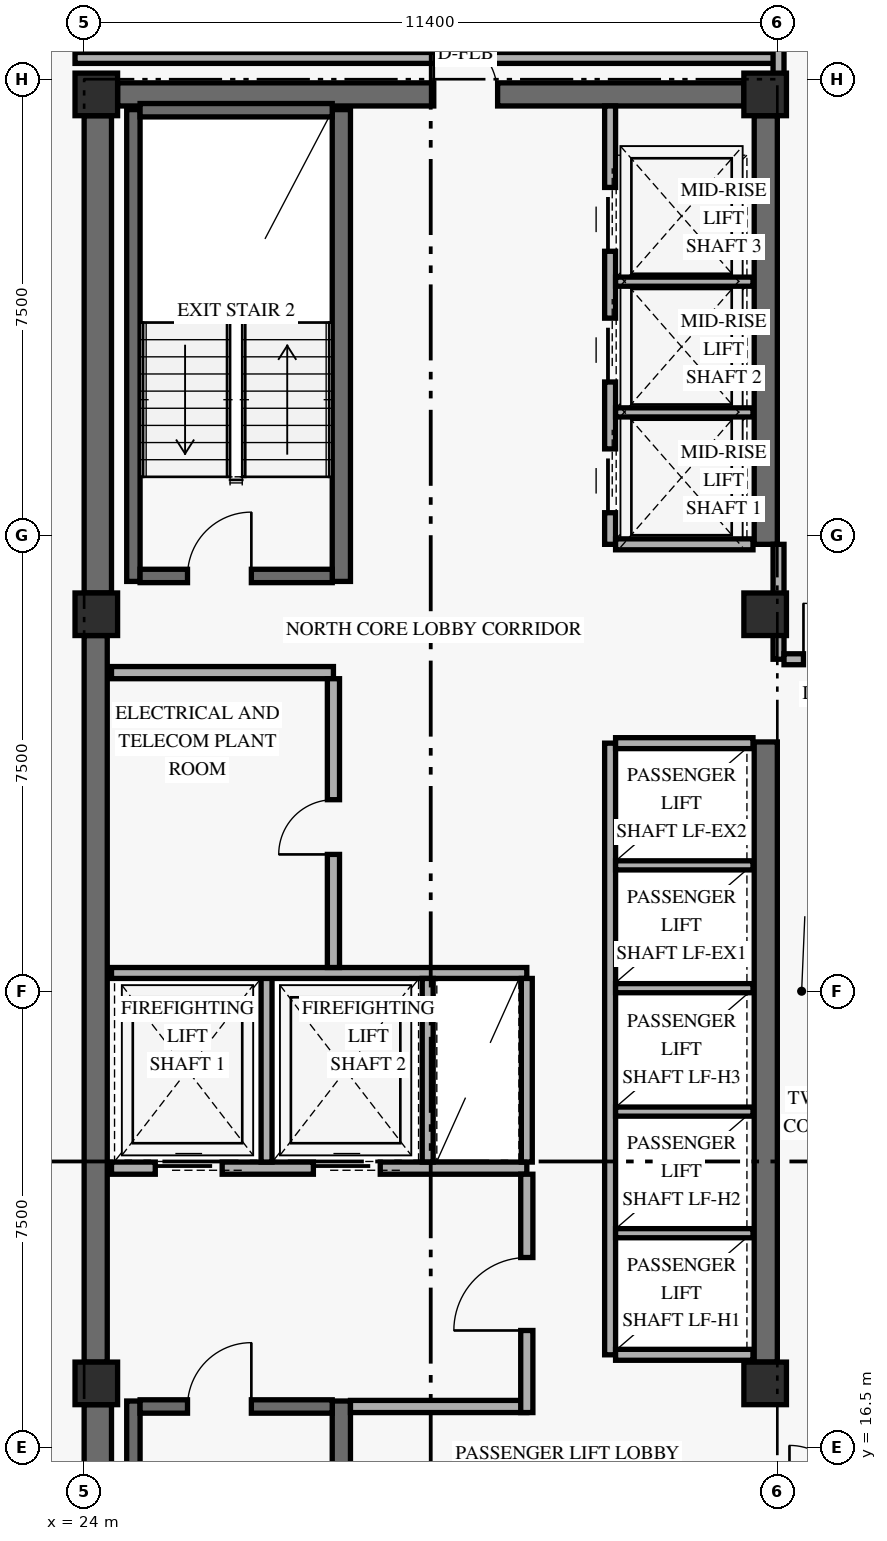
"""IFC4 building model, lengths in metres.
Left out: names, types, materials, properties, quantities, classifications, styles, units other than length and angle.
Written with IfcOpenShell. Run it as: python <this file> out.ifc"""

import sys

from ifc_helpers import new_model, si_unit, direction, frame, frame_2d, origin, origin_2d, place, context, subcontext, project, spatial, rectangle, extrude, element, fill, save


model = new_model("IFC4")
c1 = context("Model", 3, precision=1e-05, world=origin(), true_north=direction((0.0, 1.0)))
c2 = subcontext(c1, "Body", "Model", "MODEL_VIEW")
j1 = project(units=[si_unit("LENGTHUNIT", "METRE"), si_unit("PLANEANGLEUNIT", "RADIAN")], contexts=[c1])
p1 = place(None, origin())
s1 = spatial("IfcSite", under=j1, at=p1, CompositionType="ELEMENT")
p2 = place(p1, origin())
s2 = spatial("IfcBuilding", under=s1, at=p2, CompositionType="ELEMENT")
p3 = place(p2, frame((0.0, 0.0, 177.6)))
s3 = spatial("IfcBuildingStorey", under=s2, at=p3, CompositionType="ELEMENT", Elevation=177.6)
p4 = place(p3, frame((24.225, 9.6, 0.0), z_axis=(0.0, 0.0, 1.0), x_axis=(0.0, 1.0, 0.0)))
e1 = element("IfcWall", 1, at=p4, inside=s3, PredefinedType="SHEAR", context=c2, shape_type="SweptSolid", body=[
    extrude(rectangle(XDim=7.6, YDim=0.45, at=frame_2d((3.8, 0.0))), origin(), (0.0, 0.0, 1.0), 2.748),
])
p5 = place(p3, frame((24.19, 17.9, 0.0), z_axis=(0.0, 0.0, 1.0), x_axis=(0.0, 1.0, 0.0)))
e2 = element("IfcWall", 2, at=p5, inside=s3, PredefinedType="SHEAR", context=c2, shape_type="SweptSolid", body=[
    extrude(rectangle(XDim=11.95, YDim=0.38, at=frame_2d((5.975, 0.0))), origin(), (0.0, 0.0, 1.0), 2.748),
])
p6 = place(p3, frame((24.225, 30.55, 0.0), z_axis=(0.0, 0.0, 1.0), x_axis=(0.0, 1.0, 0.0)))
e3 = element("IfcWall", 3, at=p6, inside=s3, PredefinedType="SHEAR", context=c2, shape_type="SweptSolid", body=[
    extrude(rectangle(XDim=7.85, YDim=0.45, at=frame_2d((3.925, 0.0))), origin(), (0.0, 0.0, 1.0), 2.748),
])
p7 = place(p3, frame((35.21, 17.9, 0.0), z_axis=(0.0, 0.0, 1.0), x_axis=(0.0, 1.0, 0.0)))
e4 = element("IfcWall", 4, at=p7, inside=s3, PredefinedType="SHEAR", context=c2, shape_type="SweptSolid", body=[
    extrude(rectangle(XDim=10.2, YDim=0.38, at=frame_2d((5.1, 0.0))), origin(), (0.0, 0.0, 1.0), 2.748),
])
p8 = place(p3, frame((35.21, 31.35, 0.0), z_axis=(0.0, 0.0, 1.0), x_axis=(0.0, 1.0, 0.0)))
e5 = element("IfcWall", 5, at=p8, inside=s3, PredefinedType="SHEAR", context=c2, shape_type="SweptSolid", body=[
    extrude(rectangle(XDim=7.05, YDim=0.38, at=frame_2d((3.525, 0.0))), origin(), (0.0, 0.0, 1.0), 2.748),
])
p9 = place(p3, frame((24.55, 38.75, 0.0), z_axis=(0.0, 0.0, 1.0), x_axis=(1.0, 0.0, 0.0)))
e6 = element("IfcWall", 6, at=p9, inside=s3, PredefinedType="SHEAR", context=c2, shape_type="SweptSolid", body=[
    extrude(rectangle(XDim=10.3, YDim=0.38, at=frame_2d((5.15, 0.0))), origin(), (0.0, 0.0, 1.0), 3.36),
])
p10 = place(p9, frame((5.2, 0.0, 0.0)))
e7 = element("IfcOpeningElement", 7, at=p10, cuts=e6, PredefinedType="OPENING", context=c2, shape_type="SweptSolid", body=[
    extrude(rectangle(XDim=1.05, YDim=2.15, at=frame_2d((0.525, 1.075))), frame((0.0, 0.2, 0.0), z_axis=(0.0, -1.0, 0.0), x_axis=(1.0, 0.0, 0.0)), (0.0, 0.0, 1.0), 0.4),
])
p11 = place(p3, frame((24.81, 9.5, 0.0), z_axis=(0.0, 0.0, 1.0), x_axis=(0.0, 1.0, 0.0)))
e8 = element("IfcWall", 8, at=p11, inside=s3, PredefinedType="SHEAR", context=c2, shape_type="SweptSolid", body=[
    extrude(rectangle(XDim=7.76, YDim=0.22, at=frame_2d((3.88, 0.0))), origin(), (0.0, 0.0, 1.0), 3.36),
])
p12 = place(p3, frame((28.23, 9.5, 0.0), z_axis=(0.0, 0.0, 1.0), x_axis=(0.0, 1.0, 0.0)))
e9 = element("IfcWall", 9, at=p12, inside=s3, PredefinedType="SHEAR", context=c2, shape_type="SweptSolid", body=[
    extrude(rectangle(XDim=7.76, YDim=0.3, at=frame_2d((3.88, 0.0))), origin(), (0.0, 0.0, 1.0), 3.36),
])
p13 = place(p3, frame((24.92, 17.17, 0.0), z_axis=(0.0, 0.0, 1.0), x_axis=(1.0, 0.0, 0.0)))
e10 = element("IfcWall", 10, at=p13, inside=s3, PredefinedType="SHEAR", context=c2, shape_type="SweptSolid", body=[
    extrude(rectangle(XDim=3.16, YDim=0.22, at=frame_2d((1.58, 0.0))), origin(), (0.0, 0.0, 1.0), 3.36),
])
p14 = place(p13, frame((0.78, 0.0, 0.0)))
e11 = element("IfcOpeningElement", 11, at=p14, cuts=e10, PredefinedType="OPENING", context=c2, shape_type="SweptSolid", body=[
    extrude(rectangle(XDim=1.05, YDim=2.15, at=frame_2d((0.525, 1.075))), frame((0.0, 0.12, 0.0), z_axis=(0.0, -1.0, 0.0), x_axis=(1.0, 0.0, 0.0)), (0.0, 0.0, 1.0), 0.24),
])
p15 = place(p3, frame((24.81, 30.74, 0.0), z_axis=(0.0, 0.0, 1.0), x_axis=(0.0, 1.0, 0.0)))
e12 = element("IfcWall", 12, at=p15, inside=s3, PredefinedType="SHEAR", context=c2, shape_type="SweptSolid", body=[
    extrude(rectangle(XDim=7.76, YDim=0.22, at=frame_2d((3.88, 0.0))), origin(), (0.0, 0.0, 1.0), 3.36),
])
p16 = place(p3, frame((28.23, 30.74, 0.0), z_axis=(0.0, 0.0, 1.0), x_axis=(0.0, 1.0, 0.0)))
e13 = element("IfcWall", 13, at=p16, inside=s3, PredefinedType="SHEAR", context=c2, shape_type="SweptSolid", body=[
    extrude(rectangle(XDim=7.76, YDim=0.3, at=frame_2d((3.88, 0.0))), origin(), (0.0, 0.0, 1.0), 3.36),
])
p17 = place(p3, frame((24.92, 30.83, 0.0), z_axis=(0.0, 0.0, 1.0), x_axis=(1.0, 0.0, 0.0)))
e14 = element("IfcWall", 14, at=p17, inside=s3, PredefinedType="SHEAR", context=c2, shape_type="SweptSolid", body=[
    extrude(rectangle(XDim=3.16, YDim=0.22, at=frame_2d((1.58, 0.0))), origin(), (0.0, 0.0, 1.0), 3.36),
])
p18 = place(p17, frame((0.78, 0.0, 0.0)))
e15 = element("IfcOpeningElement", 15, at=p18, cuts=e14, PredefinedType="OPENING", context=c2, shape_type="SweptSolid", body=[
    extrude(rectangle(XDim=1.05, YDim=2.15, at=frame_2d((0.525, 1.075))), frame((0.0, 0.12, 0.0), z_axis=(0.0, -1.0, 0.0), x_axis=(1.0, 0.0, 0.0)), (0.0, 0.0, 1.0), 0.24),
])
p19 = place(p3, frame((24.92, 38.49, 0.0), z_axis=(0.0, 0.0, 1.0), x_axis=(1.0, 0.0, 0.0)))
e16 = element("IfcWall", 16, at=p19, inside=s3, PredefinedType="SHEAR", context=c2, shape_type="SweptSolid", body=[
    extrude(rectangle(XDim=3.16, YDim=0.22, at=frame_2d((1.58, 0.0))), origin(), (0.0, 0.0, 1.0), 3.36),
])
for number, where, z_axis, x_axis in (
    (17, (24.2, 17.55, 0.0), (0.0, 0.0, 1.0), (1.0, 0.0, 0.0)),
    (18, (24.2, 30.2, 0.0), (0.0, 0.0, 1.0), (1.0, 0.0, 0.0)),
    (19, (24.2, 38.75, 0.0), (0.0, 0.0, 1.0), (1.0, 0.0, 0.0)),
    (20, (35.2, 17.55, 0.0), (0.0, 0.0, 1.0), (1.0, 0.0, 0.0)),
    (21, (35.2, 30.2, 0.0), (0.0, 0.0, 1.0), (1.0, 0.0, 0.0)),
    (22, (35.2, 38.75, 0.0), (0.0, 0.0, 1.0), (1.0, 0.0, 0.0)),
):
    element("IfcColumn", number, at=place(p3, frame(where, z_axis=z_axis, x_axis=x_axis)), inside=s3, PredefinedType="COLUMN", context=c2, shape_type="SweptSolid", body=[
        extrude(rectangle(XDim=0.7, YDim=0.7, at=origin_2d()), origin(), (0.0, 0.0, 1.0), 3.6),
    ])
p20 = place(p3, frame((24.45, 21.09, 0.0), z_axis=(0.0, 0.0, 1.0), x_axis=(1.0, 0.0, 0.0)))
e23 = element("IfcWall", 23, at=p20, inside=s3, PredefinedType="STANDARD", context=c2, shape_type="SweptSolid", body=[
    extrude(rectangle(XDim=6.83, YDim=0.2, at=frame_2d((3.415, 0.0))), origin(), (0.0, 0.0, 1.0), 3.36),
])
p21 = place(p20, frame((0.72, 0.0, 0.0)))
e24 = element("IfcOpeningElement", 24, at=p21, cuts=e23, PredefinedType="OPENING", context=c2, shape_type="SweptSolid", body=[
    extrude(rectangle(XDim=1.1, YDim=2.2, at=frame_2d((0.55, 1.1))), frame((0.0, 0.11, 0.0), z_axis=(0.0, -1.0, 0.0), x_axis=(1.0, 0.0, 0.0)), (0.0, 0.0, 1.0), 0.22),
])
p22 = place(p20, frame((3.32, 0.0, 0.0)))
e25 = element("IfcOpeningElement", 25, at=p22, cuts=e23, PredefinedType="OPENING", context=c2, shape_type="SweptSolid", body=[
    extrude(rectangle(XDim=1.1, YDim=2.2, at=frame_2d((0.55, 1.1))), frame((0.0, 0.11, 0.0), z_axis=(0.0, -1.0, 0.0), x_axis=(1.0, 0.0, 0.0)), (0.0, 0.0, 1.0), 0.22),
])
p23 = place(p3, frame((28.38, 17.17, 0.0), z_axis=(0.0, 0.0, 1.0), x_axis=(1.0, 0.0, 0.0)))
e26 = element("IfcWall", 26, at=p23, inside=s3, PredefinedType="STANDARD", context=c2, shape_type="SweptSolid", body=[
    extrude(rectangle(XDim=2.9, YDim=0.2, at=frame_2d((1.45, 0.0))), origin(), (0.0, 0.0, 1.0), 3.36),
])
p24 = place(p3, frame((31.28, 17.07, 0.0), z_axis=(0.0, 0.0, 1.0), x_axis=(0.0, 1.0, 0.0)))
e27 = element("IfcWall", 27, at=p24, inside=s3, PredefinedType="STANDARD", context=c2, shape_type="SweptSolid", body=[
    extrude(rectangle(XDim=3.92, YDim=0.2, at=frame_2d((1.96, 0.0))), origin(), (0.0, 0.0, 1.0), 2.73),
])
p25 = place(p24, frame((1.35, 0.0, 0.0)))
e28 = element("IfcOpeningElement", 28, at=p25, cuts=e27, PredefinedType="OPENING", context=c2, shape_type="SweptSolid", body=[
    extrude(rectangle(XDim=1.2, YDim=2.15, at=frame_2d((0.6, 1.075))), frame((0.0, 0.11, 0.0), z_axis=(0.0, -1.0, 0.0), x_axis=(1.0, 0.0, 0.0)), (0.0, 0.0, 1.0), 0.22),
])
p26 = place(p3, frame((27.0, 21.19, 0.0), z_axis=(0.0, 0.0, 1.0), x_axis=(0.0, 1.0, 0.0)))
e29 = element("IfcWall", 29, at=p26, inside=s3, PredefinedType="STANDARD", context=c2, shape_type="SweptSolid", body=[
    extrude(rectangle(XDim=3.11, YDim=0.18, at=frame_2d((1.555, 0.0))), origin(), (0.0, 0.0, 1.0), 3.36),
])
p27 = place(p3, frame((24.45, 24.3, 0.0), z_axis=(0.0, 0.0, 1.0), x_axis=(1.0, 0.0, 0.0)))
e30 = element("IfcWall", 30, at=p27, inside=s3, PredefinedType="STANDARD", context=c2, shape_type="SweptSolid", body=[
    extrude(rectangle(XDim=6.83, YDim=0.18, at=frame_2d((3.415, 0.0))), origin(), (0.0, 0.0, 1.0), 3.36),
])
for number, where, z_axis, x_axis in (
    (31, (29.65, 21.19, 0.0), (0.0, 0.0, 1.0), (0.0, 1.0, 0.0)),
    (32, (31.28, 21.19, 0.0), (0.0, 0.0, 1.0), (0.0, 1.0, 0.0)),
):
    element("IfcWall", number, at=place(p3, frame(where, z_axis=z_axis, x_axis=x_axis)), inside=s3, PredefinedType="STANDARD", context=c2, shape_type="SweptSolid", body=[
        extrude(rectangle(XDim=3.02, YDim=0.18, at=frame_2d((1.51, 0.0))), origin(), (0.0, 0.0, 1.0), 3.36),
    ])
p28 = place(p3, frame((24.45, 29.24, 0.0), z_axis=(0.0, 0.0, 1.0), x_axis=(1.0, 0.0, 0.0)))
e33 = element("IfcWall", 33, at=p28, inside=s3, PredefinedType="STANDARD", context=c2, shape_type="SweptSolid", body=[
    extrude(rectangle(XDim=3.65, YDim=0.2, at=frame_2d((1.825, 0.0))), origin(), (0.0, 0.0, 1.0), 3.36),
])
p29 = place(p3, frame((28.1, 24.39, 0.0), z_axis=(0.0, 0.0, 1.0), x_axis=(0.0, 1.0, 0.0)))
e34 = element("IfcWall", 34, at=p29, inside=s3, PredefinedType="STANDARD", context=c2, shape_type="SweptSolid", body=[
    extrude(rectangle(XDim=4.75, YDim=0.2, at=frame_2d((2.375, 0.0))), origin(), (0.0, 0.0, 1.0), 3.36),
])
p30 = place(p29, frame((1.86, 0.0, 0.0)))
e35 = element("IfcOpeningElement", 35, at=p30, cuts=e34, PredefinedType="OPENING", context=c2, shape_type="SweptSolid", body=[
    extrude(rectangle(XDim=0.9, YDim=2.1, at=frame_2d((0.45, 1.05))), frame((0.0, 0.11, 0.0), z_axis=(0.0, -1.0, 0.0), x_axis=(1.0, 0.0, 0.0)), (0.0, 0.0, 1.0), 0.22),
])
p31 = place(p3, frame((32.65, 18.02, 0.0), z_axis=(0.0, 0.0, 1.0), x_axis=(0.0, 1.0, 0.0)))
e36 = element("IfcWall", 36, at=p31, inside=s3, PredefinedType="STANDARD", context=c2, shape_type="SweptSolid", body=[
    extrude(rectangle(XDim=10.06, YDim=0.18, at=frame_2d((5.03, 0.0))), origin(), (0.0, 0.0, 1.0), 3.36),
])
for number, where, z_axis, x_axis in (
    (37, (32.74, 18.02, 0.0), (0.0, 0.0, 1.0), (1.0, 0.0, 0.0)),
    (38, (32.74, 28.08, 0.0), (0.0, 0.0, 1.0), (1.0, 0.0, 0.0)),
):
    element("IfcWall", number, at=place(p3, frame(where, z_axis=z_axis, x_axis=x_axis)), inside=s3, PredefinedType="STANDARD", context=c2, shape_type="SweptSolid", body=[
        extrude(rectangle(XDim=2.26, YDim=0.18, at=frame_2d((1.13, 0.0))), origin(), (0.0, 0.0, 1.0), 3.36),
    ])
for number, where, z_axis, x_axis in (
    (39, (32.74, 20.02, 0.0), (0.0, 0.0, 1.0), (1.0, 0.0, 0.0)),
    (40, (32.74, 22.02, 0.0), (0.0, 0.0, 1.0), (1.0, 0.0, 0.0)),
    (41, (32.74, 24.05, 0.0), (0.0, 0.0, 1.0), (1.0, 0.0, 0.0)),
    (42, (32.74, 26.07, 0.0), (0.0, 0.0, 1.0), (1.0, 0.0, 0.0)),
):
    element("IfcWall", number, at=place(p3, frame(where, z_axis=z_axis, x_axis=x_axis)), inside=s3, PredefinedType="STANDARD", context=c2, shape_type="SweptSolid", body=[
        extrude(rectangle(XDim=2.26, YDim=0.15, at=frame_2d((1.13, 0.0))), origin(), (0.0, 0.0, 1.0), 3.36),
    ])
p32 = place(p3, frame((32.65, 31.35, 0.0), z_axis=(0.0, 0.0, 1.0), x_axis=(0.0, 1.0, 0.0)))
e43 = element("IfcWall", 43, at=p32, inside=s3, PredefinedType="STANDARD", context=c2, shape_type="SweptSolid", body=[
    extrude(rectangle(XDim=7.21, YDim=0.18, at=frame_2d((3.605, 0.0))), origin(), (0.0, 0.0, 1.0), 3.36),
])
p33 = place(p32, frame((0.52, 0.0, 0.0)))
e44 = element("IfcOpeningElement", 44, at=p33, cuts=e43, PredefinedType="OPENING", context=c2, shape_type="SweptSolid", body=[
    extrude(rectangle(XDim=1.05, YDim=2.2, at=frame_2d((0.525, 1.1))), frame((0.0, 0.1, 0.0), z_axis=(0.0, -1.0, 0.0), x_axis=(1.0, 0.0, 0.0)), (0.0, 0.0, 1.0), 0.2),
])
p34 = place(p32, frame((2.67, 0.0, 0.0)))
e45 = element("IfcOpeningElement", 45, at=p34, cuts=e43, PredefinedType="OPENING", context=c2, shape_type="SweptSolid", body=[
    extrude(rectangle(XDim=1.05, YDim=2.2, at=frame_2d((0.525, 1.1))), frame((0.0, 0.1, 0.0), z_axis=(0.0, -1.0, 0.0), x_axis=(1.0, 0.0, 0.0)), (0.0, 0.0, 1.0), 0.2),
])
p35 = place(p32, frame((4.82, 0.0, 0.0)))
e46 = element("IfcOpeningElement", 46, at=p35, cuts=e43, PredefinedType="OPENING", context=c2, shape_type="SweptSolid", body=[
    extrude(rectangle(XDim=1.05, YDim=2.2, at=frame_2d((0.525, 1.1))), frame((0.0, 0.1, 0.0), z_axis=(0.0, -1.0, 0.0), x_axis=(1.0, 0.0, 0.0)), (0.0, 0.0, 1.0), 0.2),
])
p36 = place(p3, frame((32.74, 31.35, 0.0), z_axis=(0.0, 0.0, 1.0), x_axis=(1.0, 0.0, 0.0)))
e47 = element("IfcWall", 47, at=p36, inside=s3, PredefinedType="STANDARD", context=c2, shape_type="SweptSolid", body=[
    extrude(rectangle(XDim=2.26, YDim=0.18, at=frame_2d((1.13, 0.0))), origin(), (0.0, 0.0, 1.0), 3.36),
])
for number, where, z_axis, x_axis in (
    (48, (32.74, 33.52, 0.0), (0.0, 0.0, 1.0), (1.0, 0.0, 0.0)),
    (49, (32.74, 35.67, 0.0), (0.0, 0.0, 1.0), (1.0, 0.0, 0.0)),
):
    element("IfcWall", number, at=place(p3, frame(where, z_axis=z_axis, x_axis=x_axis)), inside=s3, PredefinedType="STANDARD", context=c2, shape_type="SweptSolid", body=[
        extrude(rectangle(XDim=2.26, YDim=0.15, at=frame_2d((1.13, 0.0))), origin(), (0.0, 0.0, 1.0), 3.36),
    ])
p37 = place(p3, frame((35.42, 29.46, 0.0), z_axis=(0.0, 0.0, 1.0), x_axis=(0.0, 1.0, 0.0)))
e50 = element("IfcWall", 50, at=p37, inside=s3, PredefinedType="STANDARD", context=c2, shape_type="SweptSolid", body=[
    extrude(rectangle(XDim=1.89, YDim=0.18, at=frame_2d((0.945, 0.0))), origin(), (0.0, 0.0, 1.0), 2.73),
])
p38 = place(p3, frame((35.51, 29.46, 0.0), z_axis=(0.0, 0.0, 1.0), x_axis=(1.0, 0.0, 0.0)))
e51 = element("IfcWall", 51, at=p38, inside=s3, PredefinedType="STANDARD", context=c2, shape_type="SweptSolid", body=[
    extrude(rectangle(XDim=12.29, YDim=0.18, at=frame_2d((6.145, 0.0))), origin(), (0.0, 0.0, 1.0), 2.73),
])
p39 = place(p38, frame((0.32, 0.0, 0.0)))
e52 = element("IfcOpeningElement", 52, at=p39, cuts=e51, PredefinedType="OPENING", context=c2, shape_type="SweptSolid", body=[
    extrude(rectangle(XDim=0.92, YDim=2.15, at=frame_2d((0.46, 1.075))), frame((0.0, 0.1, 0.0), z_axis=(0.0, -1.0, 0.0), x_axis=(1.0, 0.0, 0.0)), (0.0, 0.0, 1.0), 0.2),
])
p40 = place(p3, frame((23.85, 39.35, 0.0), z_axis=(0.0, 0.0, 1.0), x_axis=(1.0, 0.0, 0.0)))
e53 = element("IfcWall", 53, at=p40, inside=s3, PredefinedType="STANDARD", context=c2, shape_type="SweptSolid", body=[
    extrude(rectangle(XDim=11.57, YDim=0.18, at=frame_2d((5.785, 0.0))), origin(), (0.0, 0.0, 1.0), 2.73),
])
p41 = place(p3, frame((35.42, 38.75, 0.0), z_axis=(0.0, 0.0, 1.0), x_axis=(0.0, 1.0, 0.0)))
e54 = element("IfcWall", 54, at=p41, inside=s3, PredefinedType="PARTITIONING", context=c2, shape_type="SweptSolid", body=[
    extrude(rectangle(XDim=4.97, YDim=0.18, at=frame_2d((2.485, 0.0))), origin(), (0.0, 0.0, 1.0), 2.73),
])
p42 = place(p14, frame((1.05, 0.0, 0.0), z_axis=(0.0, 0.0, 1.0), x_axis=(-1.0, 0.0, 0.0)))
e55 = element("IfcDoor", 55, at=p42, inside=s3, OperationType="SINGLE_SWING_LEFT", PredefinedType="DOOR", context=c2, shape_type="SweptSolid", body=[
    extrude(rectangle(XDim=1.05, YDim=2.15, at=frame_2d((0.525, 1.075))), frame((0.0, 0.025, 0.0), z_axis=(0.0, -1.0, 0.0), x_axis=(1.0, 0.0, 0.0)), (0.0, 0.0, 1.0), 0.05),
])
fill(e11, e55)
p43 = place(p18, origin())
e56 = element("IfcDoor", 56, at=p43, inside=s3, OperationType="SINGLE_SWING_RIGHT", PredefinedType="DOOR", context=c2, shape_type="SweptSolid", body=[
    extrude(rectangle(XDim=1.05, YDim=2.15, at=frame_2d((0.525, 1.075))), frame((0.0, 0.025, 0.0), z_axis=(0.0, -1.0, 0.0), x_axis=(1.0, 0.0, 0.0)), (0.0, 0.0, 1.0), 0.05),
])
fill(e15, e56)
p44 = place(p21, origin())
e57 = element("IfcDoor", 57, at=p44, inside=s3, OperationType="SLIDING_TO_LEFT", PredefinedType="DOOR", context=c2, shape_type="SweptSolid", body=[
    extrude(rectangle(XDim=1.1, YDim=2.2, at=frame_2d((0.55, 1.1))), frame((0.0, 0.025, 0.0), z_axis=(0.0, -1.0, 0.0), x_axis=(1.0, 0.0, 0.0)), (0.0, 0.0, 1.0), 0.05),
])
fill(e24, e57)
p45 = place(p22, origin())
e58 = element("IfcDoor", 58, at=p45, inside=s3, OperationType="SLIDING_TO_LEFT", PredefinedType="DOOR", context=c2, shape_type="SweptSolid", body=[
    extrude(rectangle(XDim=1.1, YDim=2.2, at=frame_2d((0.55, 1.1))), frame((0.0, 0.025, 0.0), z_axis=(0.0, -1.0, 0.0), x_axis=(1.0, 0.0, 0.0)), (0.0, 0.0, 1.0), 0.05),
])
fill(e25, e58)
p46 = place(p25, origin())
e59 = element("IfcDoor", 59, at=p46, inside=s3, OperationType="SINGLE_SWING_LEFT", PredefinedType="DOOR", context=c2, shape_type="SweptSolid", body=[
    extrude(rectangle(XDim=1.2, YDim=2.15, at=frame_2d((0.6, 1.075))), frame((0.0, 0.025, 0.0), z_axis=(0.0, -1.0, 0.0), x_axis=(1.0, 0.0, 0.0)), (0.0, 0.0, 1.0), 0.05),
])
fill(e28, e59)
p47 = place(p30, origin())
e60 = element("IfcDoor", 60, at=p47, inside=s3, OperationType="SINGLE_SWING_LEFT", PredefinedType="DOOR", context=c2, shape_type="SweptSolid", body=[
    extrude(rectangle(XDim=0.9, YDim=2.1, at=frame_2d((0.45, 1.05))), frame((0.0, 0.025, 0.0), z_axis=(0.0, -1.0, 0.0), x_axis=(1.0, 0.0, 0.0)), (0.0, 0.0, 1.0), 0.05),
])
fill(e35, e60)
p48 = place(p33, origin())
e61 = element("IfcDoor", 61, at=p48, inside=s3, OperationType="SLIDING_TO_LEFT", PredefinedType="DOOR", context=c2, shape_type="SweptSolid", body=[
    extrude(rectangle(XDim=1.05, YDim=2.2, at=frame_2d((0.525, 1.1))), frame((0.0, 0.025, 0.0), z_axis=(0.0, -1.0, 0.0), x_axis=(1.0, 0.0, 0.0)), (0.0, 0.0, 1.0), 0.05),
])
fill(e44, e61)
p49 = place(p34, origin())
e62 = element("IfcDoor", 62, at=p49, inside=s3, OperationType="SLIDING_TO_LEFT", PredefinedType="DOOR", context=c2, shape_type="SweptSolid", body=[
    extrude(rectangle(XDim=1.05, YDim=2.2, at=frame_2d((0.525, 1.1))), frame((0.0, 0.025, 0.0), z_axis=(0.0, -1.0, 0.0), x_axis=(1.0, 0.0, 0.0)), (0.0, 0.0, 1.0), 0.05),
])
fill(e45, e62)
p50 = place(p35, origin())
e63 = element("IfcDoor", 63, at=p50, inside=s3, OperationType="SLIDING_TO_LEFT", PredefinedType="DOOR", context=c2, shape_type="SweptSolid", body=[
    extrude(rectangle(XDim=1.05, YDim=2.2, at=frame_2d((0.525, 1.1))), frame((0.0, 0.025, 0.0), z_axis=(0.0, -1.0, 0.0), x_axis=(1.0, 0.0, 0.0)), (0.0, 0.0, 1.0), 0.05),
])
fill(e46, e63)
p51 = place(p10, frame((1.05, 0.0, 0.0), z_axis=(0.0, 0.0, 1.0), x_axis=(-1.0, 0.0, 0.0)))
e64 = element("IfcDoor", 64, at=p51, inside=s3, OperationType="SINGLE_SWING_RIGHT", PredefinedType="DOOR", context=c2, shape_type="SweptSolid", body=[
    extrude(rectangle(XDim=1.05, YDim=2.15, at=frame_2d((0.525, 1.075))), frame((0.0, 0.025, 0.0), z_axis=(0.0, -1.0, 0.0), x_axis=(1.0, 0.0, 0.0)), (0.0, 0.0, 1.0), 0.05),
])
fill(e7, e64)
p52 = place(p39, origin())
e65 = element("IfcDoor", 65, at=p52, inside=s3, OperationType="SINGLE_SWING_LEFT", PredefinedType="DOOR", context=c2, shape_type="SweptSolid", body=[
    extrude(rectangle(XDim=0.92, YDim=2.15, at=frame_2d((0.46, 1.075))), frame((0.0, 0.025, 0.0), z_axis=(0.0, -1.0, 0.0), x_axis=(1.0, 0.0, 0.0)), (0.0, 0.0, 1.0), 0.05),
])
fill(e52, e65)
save(model, sys.argv[1])
